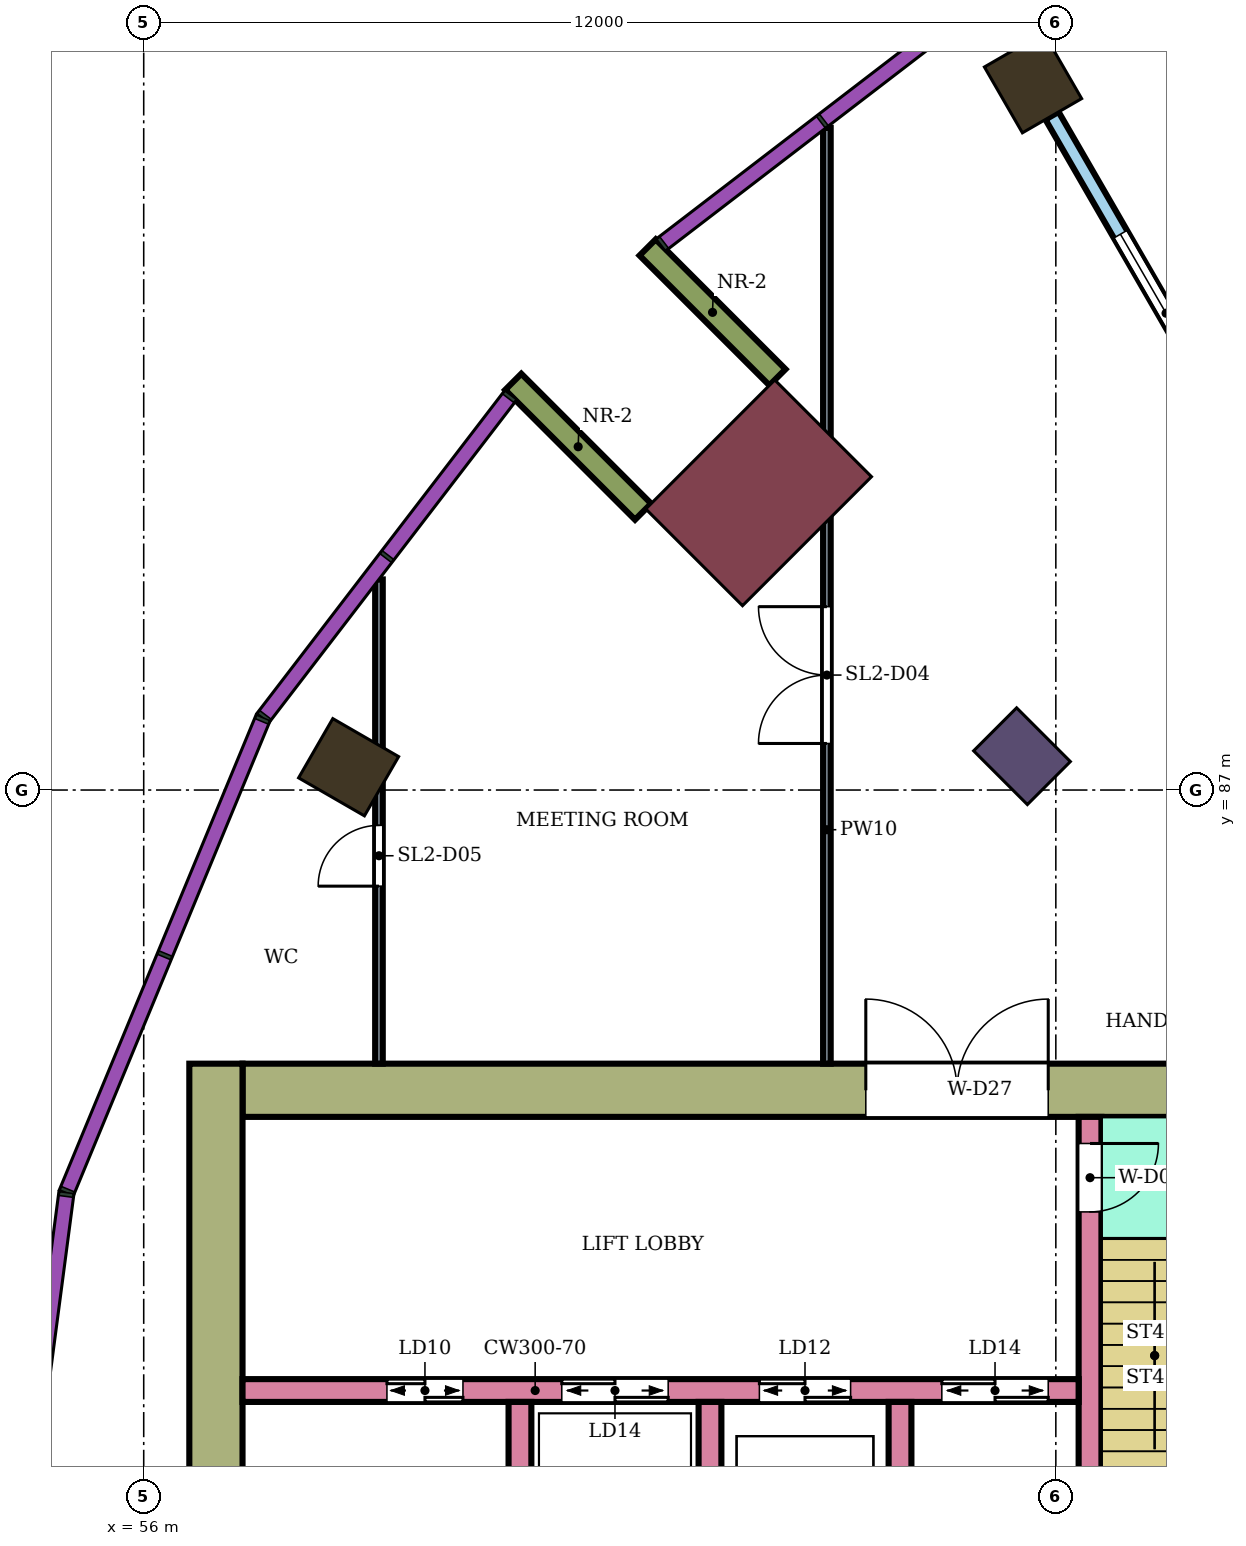
"""IFC4 building model, lengths in metres.
Left out: names, types, materials, properties, quantities, classifications, styles, units other than length and angle.
Written with IfcOpenShell. Run it as: python <this file> out.ifc"""

import sys

from ifc_helpers import new_model, si_unit, direction, frame, frame_2d, origin, origin_2d, place, context, subcontext, project, spatial, rectangle, extrude, element, fill, save


model = new_model("IFC4")
c1 = context("Model", 3, precision=1e-05, world=origin(), true_north=direction((0.0, 1.0)))
c2 = subcontext(c1, "Body", "Model", "MODEL_VIEW")
j1 = project(units=[si_unit("LENGTHUNIT", "METRE"), si_unit("PLANEANGLEUNIT", "RADIAN")], contexts=[c1])
p1 = place(None, origin())
s1 = spatial("IfcSite", under=j1, at=p1, CompositionType="ELEMENT")
p2 = place(p1, origin())
s2 = spatial("IfcBuilding", under=s1, at=p2, CompositionType="ELEMENT")
p3 = place(p2, frame((0.0, 0.0, 149.7)))
s3 = spatial("IfcBuildingStorey", under=s2, at=p3, CompositionType="ELEMENT", Elevation=149.7)
for number, where, z_axis, x_axis in (
    (1, (67.7, 96.304, 0.0), (0.0, 0.0, 1.0), (-0.5, 0.866, 0.0)),
    (2, (58.696, 87.3, 0.0), (0.0, 0.0, 1.0), (-0.866, 0.5, 0.0)),
):
    element("IfcColumn", number, at=place(p3, frame(where, z_axis=z_axis, x_axis=x_axis)), inside=s3, PredefinedType="COLUMN", context=c2, shape_type="SweptSolid", body=[
        extrude(rectangle(XDim=1.0, YDim=0.9, at=origin_2d()), origin(), (0.0, 0.0, 1.0), 8.0),
    ])
p4 = place(p3, frame((67.555, 87.445, 0.0), z_axis=(0.0, 0.0, 1.0), x_axis=(-0.707106781187, 0.707106781187, 0.0)))
e3 = element("IfcColumn", 3, at=p4, inside=s3, PredefinedType="COLUMN", context=c2, shape_type="SweptSolid", body=[
    extrude(rectangle(XDim=1.0, YDim=0.8, at=origin_2d()), origin(), (0.0, 0.0, 1.0), 8.0),
])
p5 = place(p3, frame((64.09, 90.91, 0.0), z_axis=(0.0, 0.0, 1.0), x_axis=(-0.707106781187, 0.707106781187, 0.0)))
e4 = element("IfcColumn", 4, at=p5, inside=s3, PredefinedType="COLUMN", context=c2, shape_type="SweptSolid", body=[
    extrude(rectangle(XDim=1.8, YDim=2.4, at=origin_2d()), origin(), (0.0, 0.0, 1.0), 8.0),
])
p6 = place(p3, frame((72.1, 83.05, 0.0), z_axis=(0.0, 0.0, 1.0), x_axis=(-1.0, 0.0, 0.0)))
e5 = element("IfcWall", 5, at=p6, inside=s3, PredefinedType="SHEAR", context=c2, shape_type="SweptSolid", body=[
    extrude(rectangle(XDim=14.8, YDim=0.7, at=frame_2d((7.4, 0.0))), origin(), (0.0, 0.0, 1.0), 7.68),
])
p7 = place(p6, frame((4.2, 0.0, 0.0)))
e6 = element("IfcOpeningElement", 6, at=p7, cuts=e5, PredefinedType="OPENING", context=c2, shape_type="SweptSolid", body=[
    extrude(rectangle(XDim=2.4, YDim=2.4, at=frame_2d((1.2, 1.2))), frame((0.0, 0.36, 0.0), z_axis=(0.0, -1.0, 0.0), x_axis=(1.0, 0.0, 0.0)), (0.0, 0.0, 1.0), 0.72),
])
p8 = place(p3, frame((56.95, 83.4, 0.0), z_axis=(0.0, 0.0, 1.0), x_axis=(0.0, -1.0, 0.0)))
e7 = element("IfcWall", 7, at=p8, inside=s3, PredefinedType="SHEAR", context=c2, shape_type="SweptSolid", body=[
    extrude(rectangle(XDim=16.8, YDim=0.7, at=frame_2d((8.4, 0.0))), origin(), (0.0, 0.0, 1.0), 7.68),
])
p9 = place(p3, frame((68.45, 82.7, 0.0), z_axis=(0.0, 0.0, 1.0), x_axis=(0.0, -1.0, 0.0)))
e8 = element("IfcWall", 8, at=p9, inside=s3, PredefinedType="SHEAR", context=c2, shape_type="SweptSolid", body=[
    extrude(rectangle(XDim=7.7, YDim=0.3, at=frame_2d((3.85, 0.0))), origin(), (0.0, 0.0, 1.0), 7.68),
])
p10 = place(p9, frame((0.35, 0.0, 0.0)))
e9 = element("IfcOpeningElement", 9, at=p10, cuts=e8, PredefinedType="OPENING", context=c2, shape_type="SweptSolid", body=[
    extrude(rectangle(XDim=0.9, YDim=2.1, at=frame_2d((0.45, 1.05))), frame((0.0, 0.16, 0.0), z_axis=(0.0, -1.0, 0.0), x_axis=(1.0, 0.0, 0.0)), (0.0, 0.0, 1.0), 0.32),
])
p11 = place(p3, frame((68.3, 79.1, 0.0), z_axis=(0.0, 0.0, 1.0), x_axis=(-1.0, 0.0, 0.0)))
e10 = element("IfcWall", 10, at=p11, inside=s3, PredefinedType="SHEAR", context=c2, shape_type="SweptSolid", body=[
    extrude(rectangle(XDim=11.0, YDim=0.3, at=frame_2d((5.5, 0.0))), origin(), (0.0, 0.0, 1.0), 7.68),
])
p12 = place(p11, frame((0.4, 0.0, 0.0)))
e11 = element("IfcOpeningElement", 11, at=p12, cuts=e10, PredefinedType="OPENING", context=c2, shape_type="SweptSolid", body=[
    extrude(rectangle(XDim=1.4, YDim=2.1, at=frame_2d((0.7, 1.05))), frame((0.0, 0.16, 0.0), z_axis=(0.0, -1.0, 0.0), x_axis=(1.0, 0.0, 0.0)), (0.0, 0.0, 1.0), 0.32),
])
p13 = place(p11, frame((3.0, 0.0, 0.0)))
e12 = element("IfcOpeningElement", 12, at=p13, cuts=e10, PredefinedType="OPENING", context=c2, shape_type="SweptSolid", body=[
    extrude(rectangle(XDim=1.2, YDim=2.1, at=frame_2d((0.6, 1.05))), frame((0.0, 0.16, 0.0), z_axis=(0.0, -1.0, 0.0), x_axis=(1.0, 0.0, 0.0)), (0.0, 0.0, 1.0), 0.32),
])
p14 = place(p11, frame((5.4, 0.0, 0.0)))
e13 = element("IfcOpeningElement", 13, at=p14, cuts=e10, PredefinedType="OPENING", context=c2, shape_type="SweptSolid", body=[
    extrude(rectangle(XDim=1.4, YDim=2.1, at=frame_2d((0.7, 1.05))), frame((0.0, 0.16, 0.0), z_axis=(0.0, -1.0, 0.0), x_axis=(1.0, 0.0, 0.0)), (0.0, 0.0, 1.0), 0.32),
])
p15 = place(p11, frame((8.1, 0.0, 0.0)))
e14 = element("IfcOpeningElement", 14, at=p15, cuts=e10, PredefinedType="OPENING", context=c2, shape_type="SweptSolid", body=[
    extrude(rectangle(XDim=1.0, YDim=2.1, at=frame_2d((0.5, 1.05))), frame((0.0, 0.16, 0.0), z_axis=(0.0, -1.0, 0.0), x_axis=(1.0, 0.0, 0.0)), (0.0, 0.0, 1.0), 0.32),
])
for number, where, z_axis, x_axis in (
    (15, (65.95, 78.95, 0.0), (0.0, 0.0, 1.0), (0.0, -1.0, 0.0)),
    (16, (63.45, 78.95, 0.0), (0.0, 0.0, 1.0), (0.0, -1.0, 0.0)),
    (17, (60.95, 78.95, 0.0), (0.0, 0.0, 1.0), (0.0, -1.0, 0.0)),
):
    element("IfcWall", number, at=place(p3, frame(where, z_axis=z_axis, x_axis=x_axis)), inside=s3, PredefinedType="SHEAR", context=c2, shape_type="SweptSolid", body=[
        extrude(rectangle(XDim=2.55, YDim=0.3, at=frame_2d((1.275, 0.0))), origin(), (0.0, 0.0, 1.0), 7.68),
    ])
for number, where, z_axis, x_axis in (
    (18, (64.338, 92.43, 0.0), (0.0, 0.0, 1.0), (-0.707, 0.707, 0.0)),
    (19, (62.57, 90.662, 0.0), (0.0, 0.0, 1.0), (-0.707, 0.707, 0.0)),
):
    element("IfcWall", number, at=place(p3, frame(where, z_axis=z_axis, x_axis=x_axis)), inside=s3, PredefinedType="NOTDEFINED", context=c2, shape_type="SweptSolid", body=[
        extrude(rectangle(XDim=2.416, YDim=0.3, at=frame_2d((1.208, 0.0))), origin(), (0.0, 0.0, 1.0), 8.0),
    ])
p16 = place(p3, frame((70.95, 90.675, 0.0), z_axis=(0.0, 0.0, 1.0), x_axis=(-0.500007758305, 0.866020924479, 0.0)))
e20 = element("IfcWall", 20, at=p16, inside=s3, PredefinedType="NOTDEFINED", context=c2, shape_type="SweptSolid", body=[
    extrude(rectangle(XDim=6.0, YDim=0.2, at=frame_2d((3.0, 0.0))), origin(), (0.0, 0.0, 1.0), 8.0),
])
p17 = place(p16, frame((1.8, 0.0, 0.3)))
e21 = element("IfcOpeningElement", 21, at=p17, cuts=e20, PredefinedType="OPENING", context=c2, shape_type="SweptSolid", body=[
    extrude(rectangle(XDim=2.4, YDim=3.6, at=frame_2d((1.2, 1.8))), frame((0.0, 0.11, 0.0), z_axis=(0.0, -1.0, 0.0), x_axis=(1.0, 0.0, 0.0)), (0.0, 0.0, 1.0), 0.22),
])
p18 = place(p3, frame((59.095, 83.4, 0.0), z_axis=(0.0, 0.0, 1.0), x_axis=(0.0, 1.0, 0.0)))
e22 = element("IfcWall", 22, at=p18, inside=s3, PredefinedType="PARTITIONING", context=c2, shape_type="SweptSolid", body=[
    extrude(rectangle(XDim=6.371, YDim=0.1, at=frame_2d((3.186, 0.0))), origin(), (0.0, 0.0, 1.0), 7.55),
])
p19 = place(p18, frame((2.335, 0.0, 0.0)))
e23 = element("IfcOpeningElement", 23, at=p19, cuts=e22, PredefinedType="OPENING", context=c2, shape_type="SweptSolid", body=[
    extrude(rectangle(XDim=0.8, YDim=2.1, at=frame_2d((0.4, 1.05))), frame((0.0, 0.06, 0.0), z_axis=(0.0, -1.0, 0.0), x_axis=(1.0, 0.0, 0.0)), (0.0, 0.0, 1.0), 0.12),
])
p20 = place(p3, frame((64.988, 83.4, 0.0), z_axis=(0.0, 0.0, 1.0), x_axis=(0.0, 1.0, 0.0)))
e24 = element("IfcWall", 24, at=p20, inside=s3, PredefinedType="PARTITIONING", context=c2, shape_type="SweptSolid", body=[
    extrude(rectangle(XDim=12.312, YDim=0.1, at=frame_2d((6.156, 0.0))), origin(), (0.0, 0.0, 1.0), 7.55),
])
p21 = place(p20, frame((4.212, 0.0, 0.0)))
e25 = element("IfcOpeningElement", 25, at=p21, cuts=e24, PredefinedType="OPENING", context=c2, shape_type="SweptSolid", body=[
    extrude(rectangle(XDim=1.8, YDim=2.1, at=frame_2d((0.9, 1.05))), frame((0.0, 0.06, 0.0), z_axis=(0.0, -1.0, 0.0), x_axis=(1.0, 0.0, 0.0)), (0.0, 0.0, 1.0), 0.12),
])
p22 = place(p17, origin())
e26 = element("IfcWindow", 26, at=p22, inside=s3, PartitioningType="SINGLE_PANEL", PredefinedType="WINDOW", context=c2, shape_type="SweptSolid", body=[
    extrude(rectangle(XDim=2.4, YDim=3.6, at=frame_2d((1.2, 1.8))), frame((0.0, 0.03, 0.0), z_axis=(0.0, -1.0, 0.0), x_axis=(1.0, 0.0, 0.0)), (0.0, 0.0, 1.0), 0.06),
])
fill(e21, e26)
p23 = place(p21, origin())
e27 = element("IfcDoor", 27, at=p23, inside=s3, OperationType="DOUBLE_DOOR_SINGLE_SWING", PredefinedType="DOOR", context=c2, shape_type="SweptSolid", body=[
    extrude(rectangle(XDim=1.8, YDim=2.1, at=frame_2d((0.9, 1.05))), frame((0.0, 0.025, 0.0), z_axis=(0.0, -1.0, 0.0), x_axis=(1.0, 0.0, 0.0)), (0.0, 0.0, 1.0), 0.05),
])
fill(e25, e27)
p24 = place(p19, origin())
e28 = element("IfcDoor", 28, at=p24, inside=s3, OperationType="SINGLE_SWING_LEFT", PredefinedType="DOOR", context=c2, shape_type="SweptSolid", body=[
    extrude(rectangle(XDim=0.8, YDim=2.1, at=frame_2d((0.4, 1.05))), frame((0.0, 0.025, 0.0), z_axis=(0.0, -1.0, 0.0), x_axis=(1.0, 0.0, 0.0)), (0.0, 0.0, 1.0), 0.05),
])
fill(e23, e28)
p25 = place(p10, origin())
e29 = element("IfcDoor", 29, at=p25, inside=s3, OperationType="SINGLE_SWING_LEFT", PredefinedType="DOOR", context=c2, shape_type="SweptSolid", body=[
    extrude(rectangle(XDim=0.9, YDim=2.1, at=frame_2d((0.45, 1.05))), frame((0.0, 0.025, 0.0), z_axis=(0.0, -1.0, 0.0), x_axis=(1.0, 0.0, 0.0)), (0.0, 0.0, 1.0), 0.05),
])
fill(e9, e29)
p26 = place(p12, origin())
e30 = element("IfcDoor", 30, at=p26, inside=s3, OperationType="DOUBLE_DOOR_SLIDING", PredefinedType="DOOR", context=c2, shape_type="SweptSolid", body=[
    extrude(rectangle(XDim=1.4, YDim=2.1, at=frame_2d((0.7, 1.05))), frame((0.0, 0.025, 0.0), z_axis=(0.0, -1.0, 0.0), x_axis=(1.0, 0.0, 0.0)), (0.0, 0.0, 1.0), 0.05),
])
fill(e11, e30)
p27 = place(p13, origin())
e31 = element("IfcDoor", 31, at=p27, inside=s3, OperationType="DOUBLE_DOOR_SLIDING", PredefinedType="DOOR", context=c2, shape_type="SweptSolid", body=[
    extrude(rectangle(XDim=1.2, YDim=2.1, at=frame_2d((0.6, 1.05))), frame((0.0, 0.025, 0.0), z_axis=(0.0, -1.0, 0.0), x_axis=(1.0, 0.0, 0.0)), (0.0, 0.0, 1.0), 0.05),
])
fill(e12, e31)
p28 = place(p14, origin())
e32 = element("IfcDoor", 32, at=p28, inside=s3, OperationType="DOUBLE_DOOR_SLIDING", PredefinedType="DOOR", context=c2, shape_type="SweptSolid", body=[
    extrude(rectangle(XDim=1.4, YDim=2.1, at=frame_2d((0.7, 1.05))), frame((0.0, 0.025, 0.0), z_axis=(0.0, -1.0, 0.0), x_axis=(1.0, 0.0, 0.0)), (0.0, 0.0, 1.0), 0.05),
])
fill(e13, e32)
p29 = place(p15, origin())
e33 = element("IfcDoor", 33, at=p29, inside=s3, OperationType="DOUBLE_DOOR_SLIDING", PredefinedType="DOOR", context=c2, shape_type="SweptSolid", body=[
    extrude(rectangle(XDim=1.0, YDim=2.1, at=frame_2d((0.5, 1.05))), frame((0.0, 0.025, 0.0), z_axis=(0.0, -1.0, 0.0), x_axis=(1.0, 0.0, 0.0)), (0.0, 0.0, 1.0), 0.05),
])
fill(e14, e33)
p30 = place(p7, frame((2.4, 0.0, 0.0), z_axis=(0.0, 0.0, 1.0), x_axis=(-1.0, 0.0, 0.0)))
e34 = element("IfcDoor", 34, at=p30, inside=s3, OperationType="DOUBLE_DOOR_SINGLE_SWING", PredefinedType="DOOR", context=c2, shape_type="SweptSolid", body=[
    extrude(rectangle(XDim=2.4, YDim=2.4, at=frame_2d((1.2, 1.2))), frame((0.0, 0.025, 0.0), z_axis=(0.0, -1.0, 0.0), x_axis=(1.0, 0.0, 0.0)), (0.0, 0.0, 1.0), 0.05),
])
fill(e6, e34)
save(model, sys.argv[1])
